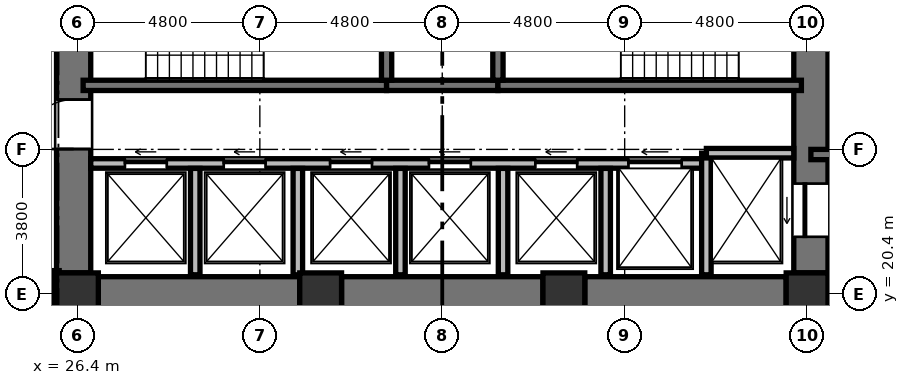
"""IFC4 building model, lengths in metres.
Left out: names, types, materials, properties, quantities, classifications, styles, units other than length and angle.
Written with IfcOpenShell. Run it as: python <this file> out.ifc"""

import sys

from ifc_helpers import new_model, si_unit, direction, frame, frame_2d, origin, origin_2d, place, context, subcontext, project, spatial, rectangle, extrude, element, fill, save


model = new_model("IFC4")
c1 = context("Model", 3, precision=1e-05, world=origin(), true_north=direction((0.0, 1.0)))
c2 = subcontext(c1, "Body", "Model", "MODEL_VIEW")
j1 = project(units=[si_unit("LENGTHUNIT", "METRE"), si_unit("PLANEANGLEUNIT", "RADIAN")], contexts=[c1])
p1 = place(None, origin())
s1 = spatial("IfcSite", under=j1, at=p1, CompositionType="ELEMENT")
p2 = place(p1, origin())
s2 = spatial("IfcBuilding", under=s1, at=p2, CompositionType="ELEMENT")
p3 = place(p2, frame((0.0, 0.0, 25.2)))
s3 = spatial("IfcBuildingStorey", under=s2, at=p3, CompositionType="ELEMENT", Elevation=25.2)
for number, where, z_axis, x_axis in (
    (1, (26.4, 20.4, 0.0), (0.0, 0.0, 1.0), (1.0, 0.0, 0.0)),
    (2, (32.8, 20.4, 0.0), (0.0, 0.0, 1.0), (1.0, 0.0, 0.0)),
    (3, (39.2, 20.4, 0.0), (0.0, 0.0, 1.0), (1.0, 0.0, 0.0)),
    (4, (45.6, 20.4, 0.0), (0.0, 0.0, 1.0), (1.0, 0.0, 0.0)),
):
    element("IfcColumn", number, at=place(p3, frame(where, z_axis=z_axis, x_axis=x_axis)), inside=s3, PredefinedType="COLUMN", context=c2, shape_type="SweptSolid", body=[
        extrude(rectangle(XDim=1.1, YDim=1.1, at=origin_2d()), origin(), (0.0, 0.0, 1.0), 3.648),
    ])
p4 = place(p3, frame((26.3, 20.95, 0.0), z_axis=(0.0, 0.0, 1.0), x_axis=(0.0, 1.0, 0.0)))
e5 = element("IfcWall", 5, at=p4, inside=s3, PredefinedType="SHEAR", context=c2, shape_type="SweptSolid", body=[
    extrude(rectangle(XDim=14.1, YDim=0.9, at=frame_2d((7.05, 0.0))), origin(), (0.0, 0.0, 1.0), 3.648),
])
p5 = place(p4, frame((6.5, 0.0, 0.0)))
e6 = element("IfcOpeningElement", 6, at=p5, cuts=e5, PredefinedType="OPENING", context=c2, shape_type="SweptSolid", body=[
    extrude(rectangle(XDim=1.2, YDim=2.15, at=frame_2d((0.6, 1.075))), frame((0.0, 0.46, 0.0), z_axis=(0.0, -1.0, 0.0), x_axis=(1.0, 0.0, 0.0)), (0.0, 0.0, 1.0), 0.92),
])
p6 = place(p4, frame((9.6, 0.0, 0.0)))
e7 = element("IfcOpeningElement", 7, at=p6, cuts=e5, PredefinedType="OPENING", context=c2, shape_type="SweptSolid", body=[
    extrude(rectangle(XDim=1.3, YDim=2.2, at=frame_2d((0.65, 1.1))), frame((0.0, 0.46, 0.0), z_axis=(0.0, -1.0, 0.0), x_axis=(1.0, 0.0, 0.0)), (0.0, 0.0, 1.0), 0.92),
])
p7 = place(p4, frame((3.26, 0.0, 0.0)))
e8 = element("IfcOpeningElement", 8, at=p7, cuts=e5, PredefinedType="OPENING", context=c2, shape_type="SweptSolid", body=[
    extrude(rectangle(XDim=1.3, YDim=2.2, at=frame_2d((0.65, 1.1))), frame((0.0, 0.46, 0.0), z_axis=(0.0, -1.0, 0.0), x_axis=(1.0, 0.0, 0.0)), (0.0, 0.0, 1.0), 0.92),
])
p8 = place(p3, frame((45.7, 20.95, 0.0), z_axis=(0.0, 0.0, 1.0), x_axis=(0.0, 1.0, 0.0)))
e9 = element("IfcWall", 9, at=p8, inside=s3, PredefinedType="SHEAR", context=c2, shape_type="SweptSolid", body=[
    extrude(rectangle(XDim=14.1, YDim=0.9, at=frame_2d((7.05, 0.0))), origin(), (0.0, 0.0, 1.0), 3.648),
])
p9 = place(p8, frame((11.75, 0.0, 0.0)))
e10 = element("IfcOpeningElement", 10, at=p9, cuts=e9, PredefinedType="OPENING", context=c2, shape_type="SweptSolid", body=[
    extrude(rectangle(XDim=1.4, YDim=2.3, at=frame_2d((0.7, 1.15))), frame((0.0, 0.46, 0.0), z_axis=(0.0, -1.0, 0.0), x_axis=(1.0, 0.0, 0.0)), (0.0, 0.0, 1.0), 0.92),
])
p10 = place(p8, frame((0.95, 0.0, 0.0)))
e11 = element("IfcOpeningElement", 11, at=p10, cuts=e9, PredefinedType="OPENING", context=c2, shape_type="SweptSolid", body=[
    extrude(rectangle(XDim=1.4, YDim=2.3, at=frame_2d((0.7, 1.15))), frame((0.0, 0.46, 0.0), z_axis=(0.0, -1.0, 0.0), x_axis=(1.0, 0.0, 0.0)), (0.0, 0.0, 1.0), 0.92),
])
p11 = place(p3, frame((26.95, 20.4, 0.0), z_axis=(0.0, 0.0, 1.0), x_axis=(1.0, 0.0, 0.0)))
e12 = element("IfcWall", 12, at=p11, inside=s3, PredefinedType="SHEAR", context=c2, shape_type="SweptSolid", body=[
    extrude(rectangle(XDim=5.3, YDim=0.9, at=frame_2d((2.65, 0.0))), origin(), (0.0, 0.0, 1.0), 3.648),
])
p12 = place(p3, frame((33.35, 20.4, 0.0), z_axis=(0.0, 0.0, 1.0), x_axis=(1.0, 0.0, 0.0)))
e13 = element("IfcWall", 13, at=p12, inside=s3, PredefinedType="SHEAR", context=c2, shape_type="SweptSolid", body=[
    extrude(rectangle(XDim=5.3, YDim=0.9, at=frame_2d((2.65, 0.0))), origin(), (0.0, 0.0, 1.0), 3.648),
])
p13 = place(p3, frame((39.75, 20.4, 0.0), z_axis=(0.0, 0.0, 1.0), x_axis=(1.0, 0.0, 0.0)))
e14 = element("IfcWall", 14, at=p13, inside=s3, PredefinedType="SHEAR", context=c2, shape_type="SweptSolid", body=[
    extrude(rectangle(XDim=5.3, YDim=0.9, at=frame_2d((2.65, 0.0))), origin(), (0.0, 0.0, 1.0), 3.648),
])
p14 = place(p3, frame((26.55, 25.885, 0.0), z_axis=(0.0, 0.0, 1.0), x_axis=(1.0, 0.0, 0.0)))
e15 = element("IfcWall", 15, at=p14, inside=s3, PredefinedType="SHEAR", context=c2, shape_type="SweptSolid", body=[
    extrude(rectangle(XDim=7.985, YDim=0.27, at=frame_2d((3.992, 0.0))), origin(), (0.0, 0.0, 1.0), 3.648),
])
p15 = place(p3, frame((34.535, 25.885, 0.0), z_axis=(0.0, 0.0, 1.0), x_axis=(1.0, 0.0, 0.0)))
e16 = element("IfcWall", 16, at=p15, inside=s3, PredefinedType="SHEAR", context=c2, shape_type="SweptSolid", body=[
    extrude(rectangle(XDim=2.93, YDim=0.27, at=frame_2d((1.465, 0.0))), origin(), (0.0, 0.0, 1.0), 3.648),
])
p16 = place(p3, frame((37.465, 25.885, 0.0), z_axis=(0.0, 0.0, 1.0), x_axis=(1.0, 0.0, 0.0)))
e17 = element("IfcWall", 17, at=p16, inside=s3, PredefinedType="SHEAR", context=c2, shape_type="SweptSolid", body=[
    extrude(rectangle(XDim=7.985, YDim=0.27, at=frame_2d((3.992, 0.0))), origin(), (0.0, 0.0, 1.0), 3.648),
])
for number, where, z_axis, x_axis in (
    (18, (34.535, 26.02, 0.0), (0.0, 0.0, 1.0), (0.0, 1.0, 0.0)),
    (19, (37.465, 26.02, 0.0), (0.0, 0.0, 1.0), (0.0, 1.0, 0.0)),
):
    element("IfcWall", number, at=place(p3, frame(where, z_axis=z_axis, x_axis=x_axis)), inside=s3, PredefinedType="SHEAR", context=c2, shape_type="SweptSolid", body=[
        extrude(rectangle(XDim=4.08, YDim=0.27, at=frame_2d((2.04, 0.0))), origin(), (0.0, 0.0, 1.0), 3.648),
    ])
p17 = place(p3, frame((26.75, 23.83, 0.0), z_axis=(0.0, 0.0, 1.0), x_axis=(1.0, 0.0, 0.0)))
e20 = element("IfcWall", 20, at=p17, inside=s3, PredefinedType="SOLIDWALL", context=c2, shape_type="SweptSolid", body=[
    extrude(rectangle(XDim=16.2, YDim=0.25, at=frame_2d((8.1, 0.0))), origin(), (0.0, 0.0, 1.0), 3.428),
])
p18 = place(p17, frame((0.9, 0.0, 0.0)))
e21 = element("IfcOpeningElement", 21, at=p18, cuts=e20, PredefinedType="OPENING", context=c2, shape_type="SweptSolid", body=[
    extrude(rectangle(XDim=1.1, YDim=2.2, at=frame_2d((0.55, 1.1))), frame((0.0, 0.135, 0.0), z_axis=(0.0, -1.0, 0.0), x_axis=(1.0, 0.0, 0.0)), (0.0, 0.0, 1.0), 0.27),
])
p19 = place(p17, frame((3.5, 0.0, 0.0)))
e22 = element("IfcOpeningElement", 22, at=p19, cuts=e20, PredefinedType="OPENING", context=c2, shape_type="SweptSolid", body=[
    extrude(rectangle(XDim=1.1, YDim=2.2, at=frame_2d((0.55, 1.1))), frame((0.0, 0.135, 0.0), z_axis=(0.0, -1.0, 0.0), x_axis=(1.0, 0.0, 0.0)), (0.0, 0.0, 1.0), 0.27),
])
p20 = place(p17, frame((6.3, 0.0, 0.0)))
e23 = element("IfcOpeningElement", 23, at=p20, cuts=e20, PredefinedType="OPENING", context=c2, shape_type="SweptSolid", body=[
    extrude(rectangle(XDim=1.1, YDim=2.2, at=frame_2d((0.55, 1.1))), frame((0.0, 0.135, 0.0), z_axis=(0.0, -1.0, 0.0), x_axis=(1.0, 0.0, 0.0)), (0.0, 0.0, 1.0), 0.27),
])
p21 = place(p17, frame((8.9, 0.0, 0.0)))
e24 = element("IfcOpeningElement", 24, at=p21, cuts=e20, PredefinedType="OPENING", context=c2, shape_type="SweptSolid", body=[
    extrude(rectangle(XDim=1.1, YDim=2.2, at=frame_2d((0.55, 1.1))), frame((0.0, 0.135, 0.0), z_axis=(0.0, -1.0, 0.0), x_axis=(1.0, 0.0, 0.0)), (0.0, 0.0, 1.0), 0.27),
])
p22 = place(p17, frame((11.7, 0.0, 0.0)))
e25 = element("IfcOpeningElement", 25, at=p22, cuts=e20, PredefinedType="OPENING", context=c2, shape_type="SweptSolid", body=[
    extrude(rectangle(XDim=1.1, YDim=2.2, at=frame_2d((0.55, 1.1))), frame((0.0, 0.135, 0.0), z_axis=(0.0, -1.0, 0.0), x_axis=(1.0, 0.0, 0.0)), (0.0, 0.0, 1.0), 0.27),
])
p23 = place(p17, frame((14.15, 0.0, 0.0)))
e26 = element("IfcOpeningElement", 26, at=p23, cuts=e20, PredefinedType="OPENING", context=c2, shape_type="SweptSolid", body=[
    extrude(rectangle(XDim=1.4, YDim=2.3, at=frame_2d((0.7, 1.15))), frame((0.0, 0.135, 0.0), z_axis=(0.0, -1.0, 0.0), x_axis=(1.0, 0.0, 0.0)), (0.0, 0.0, 1.0), 0.27),
])
p24 = place(p3, frame((42.95, 20.9, 0.0), z_axis=(0.0, 0.0, 1.0), x_axis=(0.0, 1.0, 0.0)))
e27 = element("IfcWall", 27, at=p24, inside=s3, PredefinedType="SOLIDWALL", context=c2, shape_type="SweptSolid", body=[
    extrude(rectangle(XDim=3.2, YDim=0.25, at=frame_2d((1.6, 0.0))), origin(), (0.0, 0.0, 1.0), 3.428),
])
p25 = place(p3, frame((42.95, 24.1, 0.0), z_axis=(0.0, 0.0, 1.0), x_axis=(1.0, 0.0, 0.0)))
e28 = element("IfcWall", 28, at=p25, inside=s3, PredefinedType="SOLIDWALL", context=c2, shape_type="SweptSolid", body=[
    extrude(rectangle(XDim=2.3, YDim=0.25, at=frame_2d((1.15, 0.0))), origin(), (0.0, 0.0, 1.0), 3.428),
])
for number, where, z_axis, x_axis in (
    (29, (29.5, 20.9, 0.0), (0.0, 0.0, 1.0), (0.0, 1.0, 0.0)),
    (30, (32.2, 20.9, 0.0), (0.0, 0.0, 1.0), (0.0, 1.0, 0.0)),
    (31, (34.9, 20.9, 0.0), (0.0, 0.0, 1.0), (0.0, 1.0, 0.0)),
    (32, (37.6, 20.9, 0.0), (0.0, 0.0, 1.0), (0.0, 1.0, 0.0)),
    (33, (40.3, 20.9, 0.0), (0.0, 0.0, 1.0), (0.0, 1.0, 0.0)),
):
    element("IfcWall", number, at=place(p3, frame(where, z_axis=z_axis, x_axis=x_axis)), inside=s3, PredefinedType="SOLIDWALL", context=c2, shape_type="SweptSolid", body=[
        extrude(rectangle(XDim=2.8, YDim=0.25, at=frame_2d((1.4, 0.0))), origin(), (0.0, 0.0, 1.0), 3.428),
    ])
p26 = place(p3, frame((45.7, 24.065, 0.0), z_axis=(0.0, 0.0, 1.0), x_axis=(1.0, 0.0, 0.0)))
e34 = element("IfcWall", 34, at=p26, inside=s3, PredefinedType="SHEAR", context=c2, shape_type="SweptSolid", body=[
    extrude(rectangle(XDim=4.715, YDim=0.27, at=frame_2d((2.357, 0.0))), origin(), (0.0, 0.0, 1.0), 3.648),
])
p27 = place(p3, frame((45.7, 20.02, 0.0), z_axis=(0.0, 0.0, 1.0), x_axis=(1.0, 0.0, 0.0)))
e35 = element("IfcWall", 35, at=p27, inside=s3, PredefinedType="SOLIDWALL", context=c2, shape_type="SweptSolid", body=[
    extrude(rectangle(XDim=4.715, YDim=0.25, at=frame_2d((2.357, 0.0))), origin(), (0.0, 0.0, 1.0), 2.813),
])
p28 = place(p3, frame((25.83, 21.01, 0.0), z_axis=(0.0, 0.0, 1.0), x_axis=(0.0, -1.0, 0.0)))
e36 = element("IfcWall", 36, at=p28, inside=s3, PredefinedType="PARTITIONING", context=c2, shape_type="SweptSolid", body=[
    extrude(rectangle(XDim=1.22, YDim=0.18, at=frame_2d((0.61, 0.0))), origin(), (0.0, 0.0, 1.0), 3.428),
])
p29 = place(p7, origin())
e37 = element("IfcDoor", 37, at=p29, inside=s3, OperationType="SINGLE_SWING_LEFT", PredefinedType="DOOR", context=c2, shape_type="SweptSolid", body=[
    extrude(rectangle(XDim=1.3, YDim=2.2, at=frame_2d((0.65, 1.1))), frame((0.0, 0.025, 0.0), z_axis=(0.0, -1.0, 0.0), x_axis=(1.0, 0.0, 0.0)), (0.0, 0.0, 1.0), 0.05),
])
fill(e8, e37)
p30 = place(p18, origin())
e38 = element("IfcDoor", 38, at=p30, inside=s3, OperationType="SLIDING_TO_LEFT", PredefinedType="DOOR", context=c2, shape_type="SweptSolid", body=[
    extrude(rectangle(XDim=1.1, YDim=2.2, at=frame_2d((0.55, 1.1))), frame((0.0, 0.025, 0.0), z_axis=(0.0, -1.0, 0.0), x_axis=(1.0, 0.0, 0.0)), (0.0, 0.0, 1.0), 0.05),
])
fill(e21, e38)
p31 = place(p19, origin())
e39 = element("IfcDoor", 39, at=p31, inside=s3, OperationType="SLIDING_TO_LEFT", PredefinedType="DOOR", context=c2, shape_type="SweptSolid", body=[
    extrude(rectangle(XDim=1.1, YDim=2.2, at=frame_2d((0.55, 1.1))), frame((0.0, 0.025, 0.0), z_axis=(0.0, -1.0, 0.0), x_axis=(1.0, 0.0, 0.0)), (0.0, 0.0, 1.0), 0.05),
])
fill(e22, e39)
p32 = place(p20, origin())
e40 = element("IfcDoor", 40, at=p32, inside=s3, OperationType="SLIDING_TO_LEFT", PredefinedType="DOOR", context=c2, shape_type="SweptSolid", body=[
    extrude(rectangle(XDim=1.1, YDim=2.2, at=frame_2d((0.55, 1.1))), frame((0.0, 0.025, 0.0), z_axis=(0.0, -1.0, 0.0), x_axis=(1.0, 0.0, 0.0)), (0.0, 0.0, 1.0), 0.05),
])
fill(e23, e40)
p33 = place(p21, origin())
e41 = element("IfcDoor", 41, at=p33, inside=s3, OperationType="SLIDING_TO_LEFT", PredefinedType="DOOR", context=c2, shape_type="SweptSolid", body=[
    extrude(rectangle(XDim=1.1, YDim=2.2, at=frame_2d((0.55, 1.1))), frame((0.0, 0.025, 0.0), z_axis=(0.0, -1.0, 0.0), x_axis=(1.0, 0.0, 0.0)), (0.0, 0.0, 1.0), 0.05),
])
fill(e24, e41)
p34 = place(p22, origin())
e42 = element("IfcDoor", 42, at=p34, inside=s3, OperationType="SLIDING_TO_LEFT", PredefinedType="DOOR", context=c2, shape_type="SweptSolid", body=[
    extrude(rectangle(XDim=1.1, YDim=2.2, at=frame_2d((0.55, 1.1))), frame((0.0, 0.025, 0.0), z_axis=(0.0, -1.0, 0.0), x_axis=(1.0, 0.0, 0.0)), (0.0, 0.0, 1.0), 0.05),
])
fill(e25, e42)
p35 = place(p10, origin())
e43 = element("IfcDoor", 43, at=p35, inside=s3, OperationType="SLIDING_TO_LEFT", PredefinedType="DOOR", context=c2, shape_type="SweptSolid", body=[
    extrude(rectangle(XDim=1.4, YDim=2.3, at=frame_2d((0.7, 1.15))), frame((0.0, 0.025, 0.0), z_axis=(0.0, -1.0, 0.0), x_axis=(1.0, 0.0, 0.0)), (0.0, 0.0, 1.0), 0.05),
])
fill(e11, e43)
p36 = place(p23, origin())
e44 = element("IfcDoor", 44, at=p36, inside=s3, OperationType="SLIDING_TO_LEFT", PredefinedType="DOOR", context=c2, shape_type="SweptSolid", body=[
    extrude(rectangle(XDim=1.4, YDim=2.3, at=frame_2d((0.7, 1.15))), frame((0.0, 0.025, 0.0), z_axis=(0.0, -1.0, 0.0), x_axis=(1.0, 0.0, 0.0)), (0.0, 0.0, 1.0), 0.05),
])
fill(e26, e44)
save(model, sys.argv[1])
